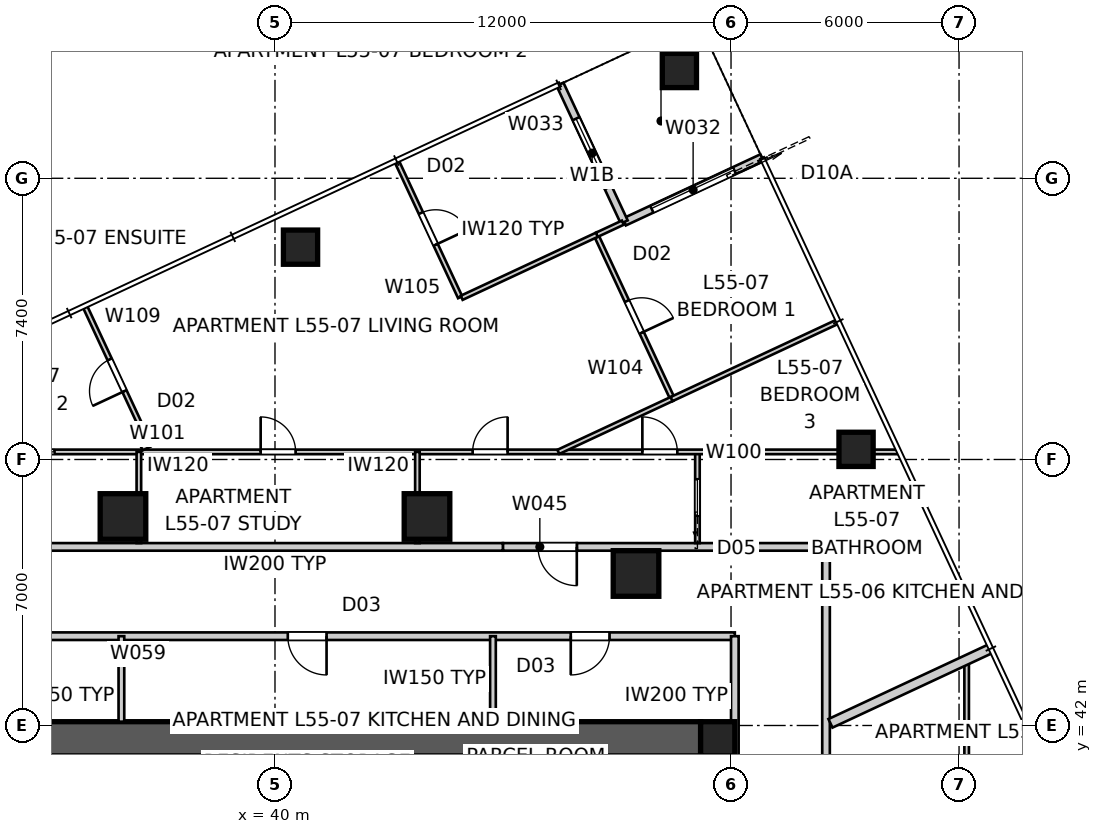
"""IFC4 building model, lengths in metres.
Left out: names, types, materials, properties, quantities, classifications, styles, units other than length and angle.
Written with IfcOpenShell. Run it as: python <this file> out.ifc"""

import sys

from ifc_helpers import new_model, si_unit, direction, frame, frame_2d, origin, origin_2d, place, context, subcontext, project, spatial, polyline, rectangle, outline, extrude, element, fill, save


model = new_model("IFC4")
c1 = context("Model", 3, precision=1e-05, world=origin(), true_north=direction((0.0, 1.0)))
c2 = subcontext(c1, "Body", "Model", "MODEL_VIEW")
j1 = project(units=[si_unit("LENGTHUNIT", "METRE"), si_unit("PLANEANGLEUNIT", "RADIAN")], contexts=[c1])
p1 = place(None, origin())
s1 = spatial("IfcSite", under=j1, at=p1, CompositionType="ELEMENT")
p2 = place(p1, origin())
s2 = spatial("IfcBuilding", under=s1, at=p2, CompositionType="ELEMENT")
p3 = place(p2, frame((0.0, 0.0, 199.8)))
s3 = spatial("IfcBuildingStorey", under=s2, at=p3, CompositionType="ELEMENT", Elevation=199.8)
p4 = place(p3, frame((28.8, 41.65, 0.0), z_axis=(0.0, 0.0, 1.0), x_axis=(1.0, 0.0, 0.0)))
e1 = element("IfcWall", 1, at=p4, inside=s3, PredefinedType="SHEAR", context=c2, shape_type="SweptSolid", body=[
    extrude(outline(polyline([(0.0, -0.45), (22.4, -0.45), (22.4, -0.025), (22.85, -0.025), (22.85, 0.025), (22.4, 0.025), (22.4, 0.45), (0.0, 0.45), (0.0, 0.025), (-0.45, 0.025), (-0.45, -0.025), (0.0, -0.025), (0.0, -0.45)])), origin(), (0.0, 0.0, 1.0), 3.4),
])
p5 = place(p3, frame((51.65, 18.8, 0.0), z_axis=(0.0, 0.0, 1.0), x_axis=(0.0, 1.0, 0.0)))
e2 = element("IfcWall", 2, at=p5, inside=s3, PredefinedType="SHEAR", context=c2, shape_type="SweptSolid", body=[
    extrude(outline(polyline([(0.0, -0.45), (22.4, -0.45), (22.4, -0.025), (22.85, -0.025), (22.85, 0.025), (22.4, 0.025), (22.4, 0.45), (0.0, 0.45), (0.0, 0.025), (-0.45, 0.025), (-0.45, -0.025), (0.0, -0.025), (0.0, -0.45)])), origin(), (0.0, 0.0, 1.0), 3.4),
])
p6 = place(p5, frame((11.14, 0.0, 0.0)))
e3 = element("IfcOpeningElement", 3, at=p6, cuts=e2, PredefinedType="OPENING", context=c2, shape_type="SweptSolid", body=[
    extrude(rectangle(XDim=1.02, YDim=2.4, at=frame_2d((0.51, 1.2))), frame((0.0, 0.46, 0.0), z_axis=(0.0, -1.0, 0.0), x_axis=(1.0, 0.0, 0.0)), (0.0, 0.0, 1.0), 0.92),
])
p7 = place(p3, frame((51.65, 41.65, 0.0), z_axis=(0.0, 0.0, 1.0), x_axis=(1.0, 0.0, 0.0)))
e4 = element("IfcColumn", 4, at=p7, inside=s3, PredefinedType="COLUMN", context=c2, shape_type="SweptSolid", body=[
    extrude(rectangle(XDim=0.9, YDim=0.9, at=origin_2d()), origin(), (0.0, 0.0, 1.0), 3.4),
])
for number, where, z_axis, x_axis in (
    (5, (55.29, 49.267, 0.0), (0.0, 0.0, 1.0), (1.0, 0.0, 0.0)),
    (6, (50.641, 59.236, 0.0), (0.0, 0.0, 1.0), (1.0, 0.0, 0.0)),
    (7, (40.672, 54.588, 0.0), (0.0, 0.0, 1.0), (1.0, 0.0, 0.0)),
):
    element("IfcColumn", number, at=place(p3, frame(where, z_axis=z_axis, x_axis=x_axis)), inside=s3, PredefinedType="COLUMN", context=c2, shape_type="SweptSolid", body=[
        extrude(rectangle(XDim=0.9, YDim=0.9, at=origin_2d()), origin(), (0.0, 0.0, 1.0), 3.2),
    ])
for number, where, z_axis, x_axis in (
    (8, (49.5, 46.0, 0.0), (0.0, 0.0, 1.0), (1.0, 0.0, 0.0)),
    (9, (44.0, 47.5, 0.0), (0.0, 0.0, 1.0), (1.0, 0.0, 0.0)),
    (10, (36.0, 47.5, 0.0), (0.0, 0.0, 1.0), (1.0, 0.0, 0.0)),
):
    element("IfcColumn", number, at=place(p3, frame(where, z_axis=z_axis, x_axis=x_axis)), inside=s3, PredefinedType="COLUMN", context=c2, shape_type="SweptSolid", body=[
        extrude(rectangle(XDim=1.2, YDim=1.2, at=origin_2d()), origin(), (0.0, 0.0, 1.0), 3.4),
    ])
p8 = place(p3, frame((52.815, 56.94, 0.0), z_axis=(0.0, 0.0, 1.0), x_axis=(-0.906289140828, -0.422658246362, 0.0)))
e11 = element("IfcWall", 11, at=p8, inside=s3, PredefinedType="SOLIDWALL", context=c2, shape_type="SweptSolid", body=[
    extrude(rectangle(XDim=4.0, YDim=0.2, at=frame_2d((2.0, 0.0))), origin(), (0.0, 0.0, 1.0), 3.2),
])
p9 = place(p8, frame((0.8, 0.0, 0.0)))
e12 = element("IfcOpeningElement", 12, at=p9, cuts=e11, PredefinedType="OPENING", context=c2, shape_type="SweptSolid", body=[
    extrude(rectangle(XDim=2.4, YDim=2.1, at=frame_2d((1.2, 1.05))), frame((0.0, 0.11, 0.0), z_axis=(0.0, -1.0, 0.0), x_axis=(1.0, 0.0, 0.0)), (0.0, 0.0, 1.0), 0.22),
])
p10 = place(p3, frame((49.19, 55.25, 0.0), z_axis=(0.0, 0.0, 1.0), x_axis=(-0.422658246362, 0.906289140828, 0.0)))
e13 = element("IfcWall", 13, at=p10, inside=s3, PredefinedType="SOLIDWALL", context=c2, shape_type="SweptSolid", body=[
    extrude(rectangle(XDim=4.0, YDim=0.2, at=frame_2d((2.0, 0.0))), origin(), (0.0, 0.0, 1.0), 3.2),
])
p11 = place(p10, frame((1.0, 0.0, 0.4)))
e14 = element("IfcOpeningElement", 14, at=p11, cuts=e13, PredefinedType="OPENING", context=c2, shape_type="SweptSolid", body=[
    extrude(rectangle(XDim=2.0, YDim=1.8, at=frame_2d((1.0, 0.9))), frame((0.0, 0.11, 0.0), z_axis=(0.0, -1.0, 0.0), x_axis=(1.0, 0.0, 0.0)), (0.0, 0.0, 1.0), 0.22),
])
p12 = place(p3, frame((54.5, 12.9, 0.0), z_axis=(0.0, 0.0, 1.0), x_axis=(0.0, 1.0, 0.0)))
e15 = element("IfcWall", 15, at=p12, inside=s3, PredefinedType="PARTITIONING", context=c2, shape_type="SweptSolid", body=[
    extrude(rectangle(XDim=33.8, YDim=0.2, at=frame_2d((16.9, 0.0))), origin(), (0.0, 0.0, 1.0), 3.2),
])
p13 = place(p12, frame((24.911, 0.0, 0.0)))
e16 = element("IfcOpeningElement", 16, at=p13, cuts=e15, PredefinedType="OPENING", context=c2, shape_type="SweptSolid", body=[
    extrude(rectangle(XDim=1.02, YDim=2.34, at=frame_2d((0.51, 1.17))), frame((0.0, 0.11, 0.0), z_axis=(0.0, -1.0, 0.0), x_axis=(1.0, 0.0, 0.0)), (0.0, 0.0, 1.0), 0.22),
])
p14 = place(p12, frame((14.759, 0.0, 0.0)))
e17 = element("IfcOpeningElement", 17, at=p14, cuts=e15, PredefinedType="OPENING", context=c2, shape_type="SweptSolid", body=[
    extrude(rectangle(XDim=1.02, YDim=2.34, at=frame_2d((0.51, 1.17))), frame((0.0, 0.11, 0.0), z_axis=(0.0, -1.0, 0.0), x_axis=(1.0, 0.0, 0.0)), (0.0, 0.0, 1.0), 0.22),
])
p15 = place(p3, frame((54.5, 46.7, 0.0), z_axis=(0.0, 0.0, 1.0), x_axis=(-1.0, 0.0, 0.0)))
e18 = element("IfcWall", 18, at=p15, inside=s3, PredefinedType="PARTITIONING", context=c2, shape_type="SweptSolid", body=[
    extrude(rectangle(XDim=6.558, YDim=0.2, at=frame_2d((3.279, 0.0))), origin(), (0.0, 0.0, 1.0), 3.2),
])
p16 = place(p3, frame((47.942, 46.7, 0.0), z_axis=(0.0, 0.0, 1.0), x_axis=(-1.0, 0.0, 0.0)))
e19 = element("IfcWall", 19, at=p16, inside=s3, PredefinedType="PARTITIONING", context=c2, shape_type="SweptSolid", body=[
    extrude(rectangle(XDim=1.945, YDim=0.2, at=frame_2d((0.973, 0.0))), origin(), (0.0, 0.0, 1.0), 2.2),
])
p17 = place(p16, origin())
e20 = element("IfcOpeningElement", 20, at=p17, cuts=e19, PredefinedType="OPENING", context=c2, shape_type="SweptSolid", body=[
    extrude(rectangle(XDim=1.02, YDim=2.1, at=frame_2d((0.51, 1.05))), frame((0.0, 0.11, 0.0), z_axis=(0.0, -1.0, 0.0), x_axis=(1.0, 0.0, 0.0)), (0.0, 0.0, 1.0), 0.22),
])
p18 = place(p3, frame((45.997, 46.7, 0.0), z_axis=(0.0, 0.0, 1.0), x_axis=(-1.0, 0.0, 0.0)))
e21 = element("IfcWall", 21, at=p18, inside=s3, PredefinedType="PARTITIONING", context=c2, shape_type="SweptSolid", body=[
    extrude(rectangle(XDim=11.993, YDim=0.2, at=frame_2d((5.997, 0.0))), origin(), (0.0, 0.0, 1.0), 3.2),
])
p19 = place(p3, frame((58.838, 44.025, 0.0), z_axis=(0.0, 0.0, 1.0), x_axis=(-0.906317010604, -0.422598481173, 0.0)))
e22 = element("IfcWall", 22, at=p19, inside=s3, PredefinedType="PARTITIONING", context=c2, shape_type="SweptSolid", body=[
    extrude(rectangle(XDim=4.657, YDim=0.25, at=frame_2d((2.329, 0.0))), origin(), (0.0, 0.0, 1.0), 3.2),
])
p20 = place(p3, frame((52.1, 44.35, 0.0), z_axis=(0.0, 0.0, 1.0), x_axis=(-1.0, 0.0, 0.0)))
e23 = element("IfcWall", 23, at=p20, inside=s3, PredefinedType="PARTITIONING", context=c2, shape_type="SweptSolid", body=[
    extrude(rectangle(XDim=24.2, YDim=0.2, at=frame_2d((12.1, 0.0))), origin(), (0.0, 0.0, 1.0), 3.2),
])
p21 = place(p20, frame((10.743, 0.0, 0.0)))
e24 = element("IfcOpeningElement", 24, at=p21, cuts=e23, PredefinedType="OPENING", context=c2, shape_type="SweptSolid", body=[
    extrude(rectangle(XDim=1.02, YDim=2.1, at=frame_2d((0.51, 1.05))), frame((0.0, 0.11, 0.0), z_axis=(0.0, -1.0, 0.0), x_axis=(1.0, 0.0, 0.0)), (0.0, 0.0, 1.0), 0.22),
])
p22 = place(p20, frame((19.636, 0.0, 0.0)))
e25 = element("IfcOpeningElement", 25, at=p22, cuts=e23, PredefinedType="OPENING", context=c2, shape_type="SweptSolid", body=[
    extrude(rectangle(XDim=1.02, YDim=2.1, at=frame_2d((0.51, 1.05))), frame((0.0, 0.11, 0.0), z_axis=(0.0, -1.0, 0.0), x_axis=(1.0, 0.0, 0.0)), (0.0, 0.0, 1.0), 0.22),
])
p23 = place(p20, frame((3.297, 0.0, 0.0)))
e26 = element("IfcOpeningElement", 26, at=p23, cuts=e23, PredefinedType="OPENING", context=c2, shape_type="SweptSolid", body=[
    extrude(rectangle(XDim=1.02, YDim=2.1, at=frame_2d((0.51, 1.05))), frame((0.0, 0.11, 0.0), z_axis=(0.0, -1.0, 0.0), x_axis=(1.0, 0.0, 0.0)), (0.0, 0.0, 1.0), 0.22),
])
p24 = place(p3, frame((52.1, 41.18, 0.0), z_axis=(0.0, 0.0, 1.0), x_axis=(0.0, 1.0, 0.0)))
e27 = element("IfcWall", 27, at=p24, inside=s3, PredefinedType="PARTITIONING", context=c2, shape_type="SweptSolid", body=[
    extrude(rectangle(XDim=3.17, YDim=0.2, at=frame_2d((1.585, 0.0))), origin(), (0.0, 0.0, 1.0), 3.2),
])
p25 = place(p3, frame((35.958, 42.1, 0.0), z_axis=(0.0, 0.0, 1.0), x_axis=(0.0, 1.0, 0.0)))
e28 = element("IfcWall", 28, at=p25, inside=s3, PredefinedType="SOLIDWALL", context=c2, shape_type="SweptSolid", body=[
    extrude(rectangle(XDim=2.25, YDim=0.15, at=frame_2d((1.125, 0.0))), origin(), (0.0, 0.0, 1.0), 3.2),
])
p26 = place(p3, frame((45.735, 42.1, 0.0), z_axis=(0.0, 0.0, 1.0), x_axis=(0.0, 1.0, 0.0)))
e29 = element("IfcWall", 29, at=p26, inside=s3, PredefinedType="SOLIDWALL", context=c2, shape_type="SweptSolid", body=[
    extrude(rectangle(XDim=2.25, YDim=0.15, at=frame_2d((1.125, 0.0))), origin(), (0.0, 0.0, 1.0), 2.671),
])
p27 = place(p3, frame((58.2, 43.728, 0.0), z_axis=(0.0, 0.0, 1.0), x_axis=(0.0, -1.0, 0.0)))
e30 = element("IfcWall", 30, at=p27, inside=s3, PredefinedType="PARTITIONING", context=c2, shape_type="SweptSolid", body=[
    extrude(rectangle(XDim=15.513, YDim=0.12, at=frame_2d((7.757, 0.0))), origin(), (0.0, 0.0, 1.0), 3.2),
])
p28 = place(p27, frame((4.954, 0.0, 0.0)))
e31 = element("IfcOpeningElement", 31, at=p28, cuts=e30, PredefinedType="OPENING", context=c2, shape_type="SweptSolid", body=[
    extrude(rectangle(XDim=0.92, YDim=2.34, at=frame_2d((0.46, 1.17))), frame((0.0, 0.07, 0.0), z_axis=(0.0, -1.0, 0.0), x_axis=(1.0, 0.0, 0.0)), (0.0, 0.0, 1.0), 0.14),
])
p29 = place(p27, frame((14.095, 0.0, 0.0)))
e32 = element("IfcOpeningElement", 32, at=p29, cuts=e30, PredefinedType="OPENING", context=c2, shape_type="SweptSolid", body=[
    extrude(rectangle(XDim=0.92, YDim=2.34, at=frame_2d((0.46, 1.17))), frame((0.0, 0.07, 0.0), z_axis=(0.0, -1.0, 0.0), x_axis=(1.0, 0.0, 0.0)), (0.0, 0.0, 1.0), 0.14),
])
p30 = place(p3, frame((51.116, 46.8, 0.0), z_axis=(0.0, 0.0, 1.0), x_axis=(0.0, 1.0, 0.0)))
e33 = element("IfcWall", 33, at=p30, inside=s3, PredefinedType="PARTITIONING", context=c2, shape_type="SweptSolid", body=[
    extrude(rectangle(XDim=2.4, YDim=0.12, at=frame_2d((1.2, 0.0))), origin(), (0.0, 0.0, 1.0), 3.2),
])
p31 = place(p30, frame((0.72, 0.0, 0.0)))
e34 = element("IfcOpeningElement", 34, at=p31, cuts=e33, PredefinedType="OPENING", context=c2, shape_type="SweptSolid", body=[
    extrude(rectangle(XDim=0.96, YDim=2.1, at=frame_2d((0.48, 1.05))), frame((0.0, 0.07, 0.0), z_axis=(0.0, -1.0, 0.0), x_axis=(1.0, 0.0, 0.0)), (0.0, 0.0, 1.0), 0.14),
])
p32 = place(p3, frame((31.047, 49.2, 0.0), z_axis=(0.0, 0.0, 1.0), x_axis=(1.0, 0.0, 0.0)))
e35 = element("IfcWall", 35, at=p32, inside=s3, PredefinedType="PARTITIONING", context=c2, shape_type="SweptSolid", body=[
    extrude(rectangle(XDim=25.333, YDim=0.12, at=frame_2d((12.667, 0.0))), origin(), (0.0, 0.0, 1.0), 3.2),
])
p33 = place(p32, frame((14.154, 0.0, 0.0)))
e36 = element("IfcOpeningElement", 36, at=p33, cuts=e35, PredefinedType="OPENING", context=c2, shape_type="SweptSolid", body=[
    extrude(rectangle(XDim=0.92, YDim=2.34, at=frame_2d((0.46, 1.17))), frame((0.0, 0.07, 0.0), z_axis=(0.0, -1.0, 0.0), x_axis=(1.0, 0.0, 0.0)), (0.0, 0.0, 1.0), 0.14),
])
p34 = place(p32, frame((18.62, 0.0, 0.0)))
e37 = element("IfcOpeningElement", 37, at=p34, cuts=e35, PredefinedType="OPENING", context=c2, shape_type="SweptSolid", body=[
    extrude(rectangle(XDim=0.92, YDim=2.34, at=frame_2d((0.46, 1.17))), frame((0.0, 0.07, 0.0), z_axis=(0.0, -1.0, 0.0), x_axis=(1.0, 0.0, 0.0)), (0.0, 0.0, 1.0), 0.14),
])
p35 = place(p32, frame((8.576, 0.0, 0.0)))
e38 = element("IfcOpeningElement", 38, at=p35, cuts=e35, PredefinedType="OPENING", context=c2, shape_type="SweptSolid", body=[
    extrude(rectangle(XDim=0.92, YDim=2.34, at=frame_2d((0.46, 1.17))), frame((0.0, 0.07, 0.0), z_axis=(0.0, -1.0, 0.0), x_axis=(1.0, 0.0, 0.0)), (0.0, 0.0, 1.0), 0.14),
])
p36 = place(p32, frame((2.19, 0.0, 0.0)))
e39 = element("IfcOpeningElement", 39, at=p36, cuts=e35, PredefinedType="OPENING", context=c2, shape_type="SweptSolid", body=[
    extrude(rectangle(XDim=0.96, YDim=2.1, at=frame_2d((0.48, 1.05))), frame((0.0, 0.07, 0.0), z_axis=(0.0, -1.0, 0.0), x_axis=(1.0, 0.0, 0.0)), (0.0, 0.0, 1.0), 0.14),
])
for number, where, z_axis, x_axis in (
    (40, (43.748, 46.8, 0.0), (0.0, 0.0, 1.0), (0.0, 1.0, 0.0)),
    (41, (36.418, 49.2, 0.0), (0.0, 0.0, 1.0), (0.0, -1.0, 0.0)),
):
    element("IfcWall", number, at=place(p3, frame(where, z_axis=z_axis, x_axis=x_axis)), inside=s3, PredefinedType="PARTITIONING", context=c2, shape_type="SweptSolid", body=[
        extrude(rectangle(XDim=2.4, YDim=0.12, at=frame_2d((1.2, 0.0))), origin(), (0.0, 0.0, 1.0), 3.2),
    ])
p37 = place(p3, frame((48.451, 54.905, 0.0), z_axis=(0.0, 0.0, 1.0), x_axis=(0.422601250227, -0.906315719442, 0.0)))
e42 = element("IfcWall", 42, at=p37, inside=s3, PredefinedType="PARTITIONING", context=c2, shape_type="SweptSolid", body=[
    extrude(rectangle(XDim=4.75, YDim=0.12, at=frame_2d((2.375, 0.0))), origin(), (0.0, 0.0, 1.0), 3.2),
])
p38 = place(p37, frame((1.915, 0.0, 0.0)))
e43 = element("IfcOpeningElement", 43, at=p38, cuts=e42, PredefinedType="OPENING", context=c2, shape_type="SweptSolid", body=[
    extrude(rectangle(XDim=0.92, YDim=2.34, at=frame_2d((0.46, 1.17))), frame((0.0, 0.07, 0.0), z_axis=(0.0, -1.0, 0.0), x_axis=(1.0, 0.0, 0.0)), (0.0, 0.0, 1.0), 0.14),
])
p39 = place(p3, frame((43.211, 56.831, 0.0), z_axis=(0.0, 0.0, 1.0), x_axis=(0.422671204118, -0.906283097718, 0.0)))
e44 = element("IfcWall", 44, at=p39, inside=s3, PredefinedType="PARTITIONING", context=c2, shape_type="SweptSolid", body=[
    extrude(rectangle(XDim=3.93, YDim=0.12, at=frame_2d((1.965, 0.0))), origin(), (0.0, 0.0, 1.0), 3.2),
])
p40 = place(p39, frame((1.485, 0.0, 0.0)))
e45 = element("IfcOpeningElement", 45, at=p40, cuts=e44, PredefinedType="OPENING", context=c2, shape_type="SweptSolid", body=[
    extrude(rectangle(XDim=0.92, YDim=2.34, at=frame_2d((0.46, 1.17))), frame((0.0, 0.07, 0.0), z_axis=(0.0, -1.0, 0.0), x_axis=(1.0, 0.0, 0.0)), (0.0, 0.0, 1.0), 0.14),
])
p41 = place(p3, frame((44.912, 53.255, 0.0), z_axis=(0.0, 0.0, 1.0), x_axis=(0.906312776101, 0.422607562492, 0.0)))
e46 = element("IfcWall", 46, at=p41, inside=s3, PredefinedType="PARTITIONING", context=c2, shape_type="SweptSolid", body=[
    extrude(rectangle(XDim=3.944, YDim=0.12, at=frame_2d((1.972, 0.0))), origin(), (0.0, 0.0, 1.0), 3.2),
])
p42 = place(p3, frame((50.452, 50.597, 0.0), z_axis=(0.0, 0.0, 1.0), x_axis=(-0.906307614177, -0.42261863244, 0.0)))
e47 = element("IfcWall", 47, at=p42, inside=s3, PredefinedType="PARTITIONING", context=c2, shape_type="SweptSolid", body=[
    extrude(rectangle(XDim=3.306, YDim=0.12, at=frame_2d((1.653, 0.0))), origin(), (0.0, 0.0, 1.0), 3.2),
])
p43 = place(p3, frame((36.492, 49.295, 0.0), z_axis=(0.0, 0.0, 1.0), x_axis=(0.906653589403, 0.421875892677, 0.0)))
e48 = element("IfcWall", 48, at=p43, inside=s3, PredefinedType="PARTITIONING", context=c2, shape_type="SweptSolid", body=[
    extrude(rectangle(XDim=0.225, YDim=0.12, at=frame_2d((0.113, 0.0))), origin(), (0.0, 0.0, 1.0), 3.2),
])
p44 = place(p3, frame((36.697, 49.39, 0.0), z_axis=(0.0, 0.0, 1.0), x_axis=(-0.422771582019, 0.906236276827, 0.0)))
e49 = element("IfcWall", 49, at=p44, inside=s3, PredefinedType="PARTITIONING", context=c2, shape_type="SweptSolid", body=[
    extrude(rectangle(XDim=3.99, YDim=0.12, at=frame_2d((1.995, 0.0))), origin(), (0.0, 0.0, 1.0), 3.2),
])
p45 = place(p44, frame((1.555, 0.0, 0.0)))
e50 = element("IfcOpeningElement", 50, at=p45, cuts=e49, PredefinedType="OPENING", context=c2, shape_type="SweptSolid", body=[
    extrude(rectangle(XDim=0.92, YDim=2.34, at=frame_2d((0.46, 1.17))), frame((0.0, 0.07, 0.0), z_axis=(0.0, -1.0, 0.0), x_axis=(1.0, 0.0, 0.0)), (0.0, 0.0, 1.0), 0.14),
])
p46 = place(p3, frame((48.469, 54.913, 0.0), z_axis=(0.0, 0.0, 1.0), x_axis=(0.906364601965, 0.422496400346, 0.0)))
e51 = element("IfcWall", 51, at=p46, inside=s3, PredefinedType="PARTITIONING", context=c2, shape_type="SweptSolid", body=[
    extrude(rectangle(XDim=0.756, YDim=0.12, at=frame_2d((0.378, 0.0))), origin(), (0.0, 0.0, 1.0), 3.2),
])
p47 = place(p3, frame((54.787, 52.618, 0.0), z_axis=(0.0, 0.0, 1.0), x_axis=(-0.906305189824, -0.422623831436, 0.0)))
e52 = element("IfcWall", 52, at=p47, inside=s3, PredefinedType="PARTITIONING", context=c2, shape_type="SweptSolid", body=[
    extrude(rectangle(XDim=4.802, YDim=0.12, at=frame_2d((2.401, 0.0))), origin(), (0.0, 0.0, 1.0), 3.2),
])
p48 = place(p9, origin())
e53 = element("IfcDoor", 53, at=p48, inside=s3, OperationType="SLIDING_TO_LEFT", PredefinedType="DOOR", context=c2, shape_type="SweptSolid", body=[
    extrude(rectangle(XDim=2.4, YDim=2.1, at=frame_2d((1.2, 1.05))), frame((0.0, 0.025, 0.0), z_axis=(0.0, -1.0, 0.0), x_axis=(1.0, 0.0, 0.0)), (0.0, 0.0, 1.0), 0.05),
])
fill(e12, e53)
p49 = place(p11, origin())
e54 = element("IfcWindow", 54, at=p49, inside=s3, PartitioningType="SINGLE_PANEL", PredefinedType="WINDOW", context=c2, shape_type="SweptSolid", body=[
    extrude(rectangle(XDim=2.0, YDim=1.8, at=frame_2d((1.0, 0.9))), frame((0.0, 0.03, 0.0), z_axis=(0.0, -1.0, 0.0), x_axis=(1.0, 0.0, 0.0)), (0.0, 0.0, 1.0), 0.06),
])
fill(e14, e54)
p50 = place(p21, origin())
e55 = element("IfcDoor", 55, at=p50, inside=s3, OperationType="SINGLE_SWING_LEFT", PredefinedType="DOOR", context=c2, shape_type="SweptSolid", body=[
    extrude(rectangle(XDim=1.02, YDim=2.1, at=frame_2d((0.51, 1.05))), frame((0.0, 0.025, 0.0), z_axis=(0.0, -1.0, 0.0), x_axis=(1.0, 0.0, 0.0)), (0.0, 0.0, 1.0), 0.05),
])
fill(e24, e55)
p51 = place(p17, origin())
e56 = element("IfcDoor", 56, at=p51, inside=s3, OperationType="SINGLE_SWING_LEFT", PredefinedType="DOOR", context=c2, shape_type="SweptSolid", body=[
    extrude(rectangle(XDim=1.02, YDim=2.1, at=frame_2d((0.51, 1.05))), frame((0.0, 0.025, 0.0), z_axis=(0.0, -1.0, 0.0), x_axis=(1.0, 0.0, 0.0)), (0.0, 0.0, 1.0), 0.05),
])
fill(e20, e56)
p52 = place(p23, origin())
e57 = element("IfcDoor", 57, at=p52, inside=s3, OperationType="SINGLE_SWING_RIGHT", PredefinedType="DOOR", context=c2, shape_type="SweptSolid", body=[
    extrude(rectangle(XDim=1.02, YDim=2.1, at=frame_2d((0.51, 1.05))), frame((0.0, 0.025, 0.0), z_axis=(0.0, -1.0, 0.0), x_axis=(1.0, 0.0, 0.0)), (0.0, 0.0, 1.0), 0.05),
])
fill(e26, e57)
p53 = place(p33, origin())
e58 = element("IfcDoor", 58, at=p53, inside=s3, OperationType="SINGLE_SWING_RIGHT", PredefinedType="DOOR", context=c2, shape_type="SweptSolid", body=[
    extrude(rectangle(XDim=0.92, YDim=2.34, at=frame_2d((0.46, 1.17))), frame((0.0, 0.025, 0.0), z_axis=(0.0, -1.0, 0.0), x_axis=(1.0, 0.0, 0.0)), (0.0, 0.0, 1.0), 0.05),
])
fill(e36, e58)
p54 = place(p34, origin())
e59 = element("IfcDoor", 59, at=p54, inside=s3, OperationType="SINGLE_SWING_LEFT", PredefinedType="DOOR", context=c2, shape_type="SweptSolid", body=[
    extrude(rectangle(XDim=0.92, YDim=2.34, at=frame_2d((0.46, 1.17))), frame((0.0, 0.025, 0.0), z_axis=(0.0, -1.0, 0.0), x_axis=(1.0, 0.0, 0.0)), (0.0, 0.0, 1.0), 0.05),
])
fill(e37, e59)
p55 = place(p31, origin())
e60 = element("IfcDoor", 60, at=p55, inside=s3, OperationType="SLIDING_TO_LEFT", PredefinedType="DOOR", context=c2, shape_type="SweptSolid", body=[
    extrude(rectangle(XDim=0.96, YDim=2.1, at=frame_2d((0.48, 1.05))), frame((0.0, 0.025, 0.0), z_axis=(0.0, -1.0, 0.0), x_axis=(1.0, 0.0, 0.0)), (0.0, 0.0, 1.0), 0.05),
])
fill(e34, e60)
p56 = place(p35, origin())
e61 = element("IfcDoor", 61, at=p56, inside=s3, OperationType="SINGLE_SWING_LEFT", PredefinedType="DOOR", context=c2, shape_type="SweptSolid", body=[
    extrude(rectangle(XDim=0.92, YDim=2.34, at=frame_2d((0.46, 1.17))), frame((0.0, 0.025, 0.0), z_axis=(0.0, -1.0, 0.0), x_axis=(1.0, 0.0, 0.0)), (0.0, 0.0, 1.0), 0.05),
])
fill(e38, e61)
p57 = place(p38, origin())
e62 = element("IfcDoor", 62, at=p57, inside=s3, OperationType="SINGLE_SWING_RIGHT", PredefinedType="DOOR", context=c2, shape_type="SweptSolid", body=[
    extrude(rectangle(XDim=0.92, YDim=2.34, at=frame_2d((0.46, 1.17))), frame((0.0, 0.025, 0.0), z_axis=(0.0, -1.0, 0.0), x_axis=(1.0, 0.0, 0.0)), (0.0, 0.0, 1.0), 0.05),
])
fill(e43, e62)
p58 = place(p45, origin())
e63 = element("IfcDoor", 63, at=p58, inside=s3, OperationType="SINGLE_SWING_LEFT", PredefinedType="DOOR", context=c2, shape_type="SweptSolid", body=[
    extrude(rectangle(XDim=0.92, YDim=2.34, at=frame_2d((0.46, 1.17))), frame((0.0, 0.025, 0.0), z_axis=(0.0, -1.0, 0.0), x_axis=(1.0, 0.0, 0.0)), (0.0, 0.0, 1.0), 0.05),
])
fill(e50, e63)
p59 = place(p40, origin())
e64 = element("IfcDoor", 64, at=p59, inside=s3, OperationType="SINGLE_SWING_RIGHT", PredefinedType="DOOR", context=c2, shape_type="SweptSolid", body=[
    extrude(rectangle(XDim=0.92, YDim=2.34, at=frame_2d((0.46, 1.17))), frame((0.0, 0.025, 0.0), z_axis=(0.0, -1.0, 0.0), x_axis=(1.0, 0.0, 0.0)), (0.0, 0.0, 1.0), 0.05),
])
fill(e45, e64)
p60 = place(p36, origin())
e65 = element("IfcDoor", 65, at=p60, inside=s3, OperationType="SLIDING_TO_LEFT", PredefinedType="DOOR", context=c2, shape_type="SweptSolid", body=[
    extrude(rectangle(XDim=0.96, YDim=2.1, at=frame_2d((0.48, 1.05))), frame((0.0, 0.025, 0.0), z_axis=(0.0, -1.0, 0.0), x_axis=(1.0, 0.0, 0.0)), (0.0, 0.0, 1.0), 0.05),
])
fill(e39, e65)
save(model, sys.argv[1])
